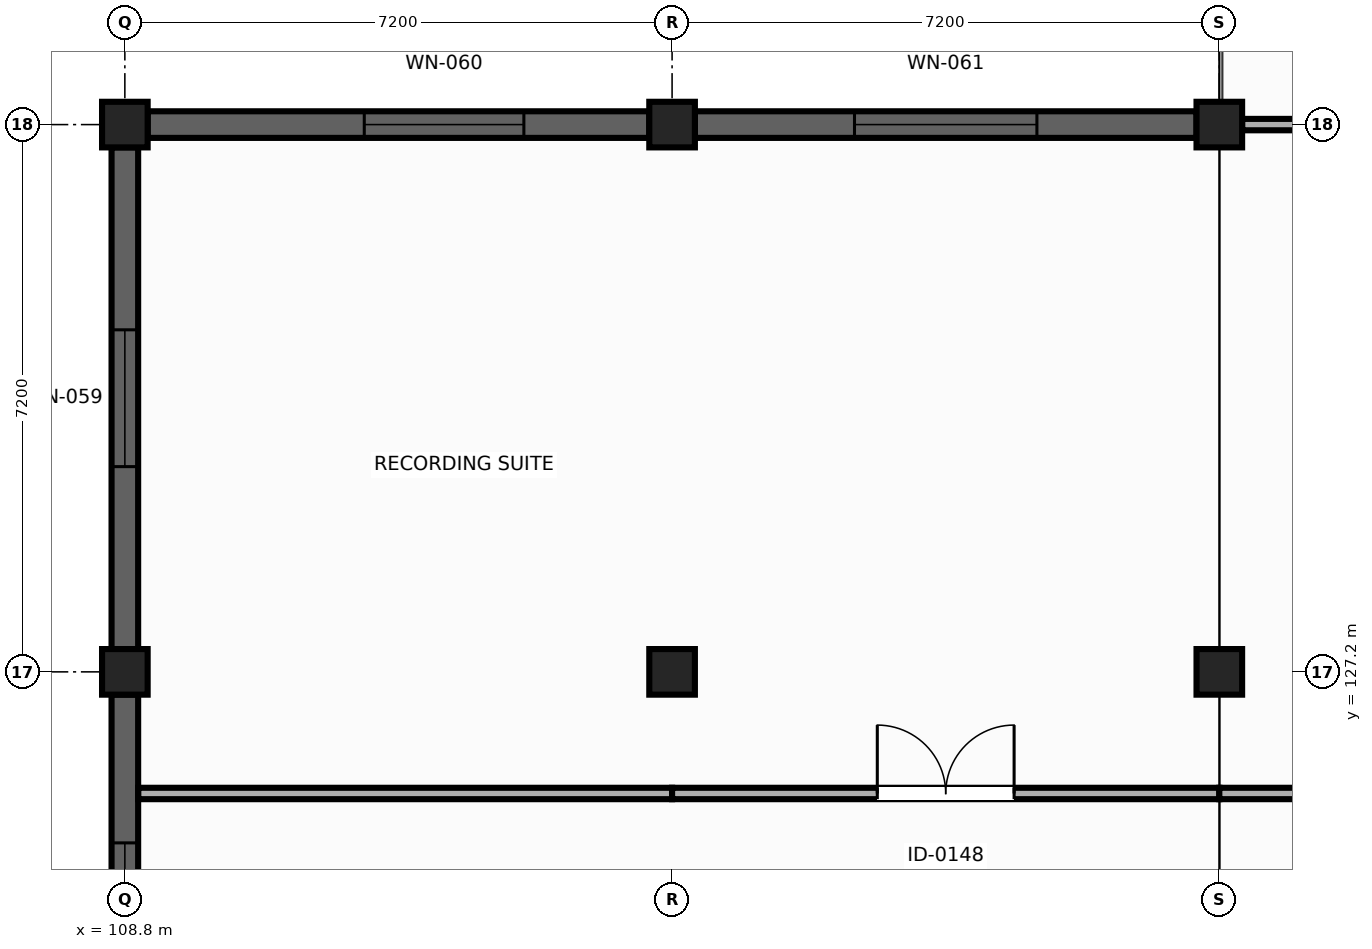
"""IFC4 building model, lengths in metres.
Left out: names, types, materials, properties, quantities, classifications, styles, units other than length and angle.
Written with IfcOpenShell. Run it as: python <this file> out.ifc"""

import sys

from ifc_helpers import new_model, si_unit, direction, frame, frame_2d, origin, origin_2d, place, context, subcontext, project, spatial, rectangle, extrude, element, fill, save


model = new_model("IFC4")
c1 = context("Model", 3, precision=1e-05, world=origin(), true_north=direction((0.0, 1.0)))
c2 = subcontext(c1, "Body", "Model", "MODEL_VIEW")
j1 = project(units=[si_unit("LENGTHUNIT", "METRE"), si_unit("PLANEANGLEUNIT", "RADIAN")], contexts=[c1])
p1 = place(None, origin())
s1 = spatial("IfcSite", under=j1, at=p1, CompositionType="ELEMENT")
p2 = place(p1, origin())
s2 = spatial("IfcBuilding", under=s1, at=p2, CompositionType="ELEMENT")
p3 = place(p2, frame((0.0, 0.0, 14.4)))
s3 = spatial("IfcBuildingStorey", under=s2, at=p3, CompositionType="ELEMENT", Elevation=14.4)
for number, where, z_axis, x_axis in (
    (1, (108.8, 127.2, 0.0), (0.0, 0.0, 1.0), (1.0, 0.0, 0.0)),
    (2, (116.0, 127.2, 0.0), (0.0, 0.0, 1.0), (0.0, 1.0, 0.0)),
    (3, (123.2, 127.2, 0.0), (0.0, 0.0, 1.0), (1.0, 0.0, 0.0)),
    (4, (108.8, 134.4, 0.0), (0.0, 0.0, 1.0), (0.0, 1.0, 0.0)),
    (5, (116.0, 134.4, 0.0), (0.0, 0.0, 1.0), (1.0, 0.0, 0.0)),
    (6, (123.2, 134.4, 0.0), (0.0, 0.0, 1.0), (0.0, 1.0, 0.0)),
):
    element("IfcColumn", number, at=place(p3, frame(where, z_axis=z_axis, x_axis=x_axis)), inside=s3, PredefinedType="COLUMN", context=c2, shape_type="SweptSolid", body=[
        extrude(rectangle(XDim=0.6, YDim=0.6, at=origin_2d()), origin(), (0.0, 0.0, 1.0), 4.5),
    ])
p4 = place(p3, frame((108.8, 120.3, 0.0), z_axis=(0.0, 0.0, 1.0), x_axis=(0.0, 1.0, 0.0)))
e7 = element("IfcWall", 7, at=p4, inside=s3, PredefinedType="SOLIDWALL", context=c2, shape_type="SweptSolid", body=[
    extrude(rectangle(XDim=6.6, YDim=0.35, at=frame_2d((3.3, 0.0))), origin(), (0.0, 0.0, 1.0), 4.22),
])
p5 = place(p4, frame((3.15, 0.0, 0.9)))
e8 = element("IfcOpeningElement", 8, at=p5, cuts=e7, PredefinedType="OPENING", context=c2, shape_type="SweptSolid", body=[
    extrude(rectangle(XDim=1.5, YDim=2.1, at=frame_2d((0.75, 1.05))), frame((0.0, 0.185, 0.0), z_axis=(0.0, -1.0, 0.0), x_axis=(1.0, 0.0, 0.0)), (0.0, 0.0, 1.0), 0.37),
])
p6 = place(p3, frame((108.8, 127.5, 0.0), z_axis=(0.0, 0.0, 1.0), x_axis=(0.0, 1.0, 0.0)))
e9 = element("IfcWall", 9, at=p6, inside=s3, PredefinedType="SOLIDWALL", context=c2, shape_type="SweptSolid", body=[
    extrude(rectangle(XDim=6.6, YDim=0.35, at=frame_2d((3.3, 0.0))), origin(), (0.0, 0.0, 1.0), 4.22),
])
p7 = place(p6, frame((2.4, 0.0, 0.9)))
e10 = element("IfcOpeningElement", 10, at=p7, cuts=e9, PredefinedType="OPENING", context=c2, shape_type="SweptSolid", body=[
    extrude(rectangle(XDim=1.8, YDim=2.1, at=frame_2d((0.9, 1.05))), frame((0.0, 0.185, 0.0), z_axis=(0.0, -1.0, 0.0), x_axis=(1.0, 0.0, 0.0)), (0.0, 0.0, 1.0), 0.37),
])
p8 = place(p3, frame((109.1, 134.4, 0.0), z_axis=(0.0, 0.0, 1.0), x_axis=(1.0, 0.0, 0.0)))
e11 = element("IfcWall", 11, at=p8, inside=s3, PredefinedType="SOLIDWALL", context=c2, shape_type="SweptSolid", body=[
    extrude(rectangle(XDim=6.6, YDim=0.35, at=frame_2d((3.3, 0.0))), origin(), (0.0, 0.0, 1.0), 4.22),
])
p9 = place(p8, frame((2.85, 0.0, 0.9)))
e12 = element("IfcOpeningElement", 12, at=p9, cuts=e11, PredefinedType="OPENING", context=c2, shape_type="SweptSolid", body=[
    extrude(rectangle(XDim=2.1, YDim=2.1, at=frame_2d((1.05, 1.05))), frame((0.0, 0.185, 0.0), z_axis=(0.0, -1.0, 0.0), x_axis=(1.0, 0.0, 0.0)), (0.0, 0.0, 1.0), 0.37),
])
p10 = place(p3, frame((116.3, 134.4, 0.0), z_axis=(0.0, 0.0, 1.0), x_axis=(1.0, 0.0, 0.0)))
e13 = element("IfcWall", 13, at=p10, inside=s3, PredefinedType="SOLIDWALL", context=c2, shape_type="SweptSolid", body=[
    extrude(rectangle(XDim=6.6, YDim=0.35, at=frame_2d((3.3, 0.0))), origin(), (0.0, 0.0, 1.0), 4.22),
])
p11 = place(p10, frame((2.1, 0.0, 0.9)))
e14 = element("IfcOpeningElement", 14, at=p11, cuts=e13, PredefinedType="OPENING", context=c2, shape_type="SweptSolid", body=[
    extrude(rectangle(XDim=2.4, YDim=2.1, at=frame_2d((1.2, 1.05))), frame((0.0, 0.185, 0.0), z_axis=(0.0, -1.0, 0.0), x_axis=(1.0, 0.0, 0.0)), (0.0, 0.0, 1.0), 0.37),
])
p12 = place(p3, frame((130.1, 134.4, 0.0), z_axis=(0.0, 0.0, 1.0), x_axis=(-1.0, 0.0, 0.0)))
e15 = element("IfcWall", 15, at=p12, inside=s3, PredefinedType="PARTITIONING", context=c2, shape_type="SweptSolid", body=[
    extrude(rectangle(XDim=6.6, YDim=0.15, at=frame_2d((3.3, 0.0))), origin(), (0.0, 0.0, 1.0), 3.715),
])
p13 = place(p3, frame((108.977, 125.6, 0.0), z_axis=(0.0, 0.0, 1.0), x_axis=(1.0, 0.0, 0.0)))
e16 = element("IfcWall", 16, at=p13, inside=s3, PredefinedType="PARTITIONING", context=c2, shape_type="SweptSolid", body=[
    extrude(rectangle(XDim=7.023, YDim=0.15, at=frame_2d((3.511, 0.0))), origin(), (0.0, 0.0, 1.0), 3.515),
])
p14 = place(p3, frame((116.0, 125.6, 0.0), z_axis=(0.0, 0.0, 1.0), x_axis=(1.0, 0.0, 0.0)))
e17 = element("IfcWall", 17, at=p14, inside=s3, PredefinedType="PARTITIONING", context=c2, shape_type="SweptSolid", body=[
    extrude(rectangle(XDim=7.2, YDim=0.15, at=frame_2d((3.6, 0.0))), origin(), (0.0, 0.0, 1.0), 3.515),
])
p15 = place(p14, frame((2.7, 0.0, 0.0)))
e18 = element("IfcOpeningElement", 18, at=p15, cuts=e17, PredefinedType="OPENING", context=c2, shape_type="SweptSolid", body=[
    extrude(rectangle(XDim=1.8, YDim=2.3, at=frame_2d((0.9, 1.15))), frame((0.0, 0.085, 0.0), z_axis=(0.0, -1.0, 0.0), x_axis=(1.0, 0.0, 0.0)), (0.0, 0.0, 1.0), 0.17),
])
p16 = place(p3, frame((123.2, 125.6, 0.0), z_axis=(0.0, 0.0, 1.0), x_axis=(1.0, 0.0, 0.0)))
e19 = element("IfcWall", 19, at=p16, inside=s3, PredefinedType="PARTITIONING", context=c2, shape_type="SweptSolid", body=[
    extrude(rectangle(XDim=7.123, YDim=0.15, at=frame_2d((3.562, 0.0))), origin(), (0.0, 0.0, 1.0), 3.515),
])
p17 = place(p5, origin())
e20 = element("IfcWindow", 20, at=p17, inside=s3, PartitioningType="SINGLE_PANEL", PredefinedType="WINDOW", context=c2, shape_type="SweptSolid", body=[
    extrude(rectangle(XDim=1.5, YDim=2.1, at=frame_2d((0.75, 1.05))), frame((0.0, 0.03, 0.0), z_axis=(0.0, -1.0, 0.0), x_axis=(1.0, 0.0, 0.0)), (0.0, 0.0, 1.0), 0.06),
])
fill(e8, e20)
p18 = place(p7, origin())
e21 = element("IfcWindow", 21, at=p18, inside=s3, PartitioningType="SINGLE_PANEL", PredefinedType="WINDOW", context=c2, shape_type="SweptSolid", body=[
    extrude(rectangle(XDim=1.8, YDim=2.1, at=frame_2d((0.9, 1.05))), frame((0.0, 0.03, 0.0), z_axis=(0.0, -1.0, 0.0), x_axis=(1.0, 0.0, 0.0)), (0.0, 0.0, 1.0), 0.06),
])
fill(e10, e21)
p19 = place(p9, origin())
e22 = element("IfcWindow", 22, at=p19, inside=s3, PartitioningType="SINGLE_PANEL", PredefinedType="WINDOW", context=c2, shape_type="SweptSolid", body=[
    extrude(rectangle(XDim=2.1, YDim=2.1, at=frame_2d((1.05, 1.05))), frame((0.0, 0.03, 0.0), z_axis=(0.0, -1.0, 0.0), x_axis=(1.0, 0.0, 0.0)), (0.0, 0.0, 1.0), 0.06),
])
fill(e12, e22)
p20 = place(p11, origin())
e23 = element("IfcWindow", 23, at=p20, inside=s3, PartitioningType="SINGLE_PANEL", PredefinedType="WINDOW", context=c2, shape_type="SweptSolid", body=[
    extrude(rectangle(XDim=2.4, YDim=2.1, at=frame_2d((1.2, 1.05))), frame((0.0, 0.03, 0.0), z_axis=(0.0, -1.0, 0.0), x_axis=(1.0, 0.0, 0.0)), (0.0, 0.0, 1.0), 0.06),
])
fill(e14, e23)
p21 = place(p15, origin())
e24 = element("IfcDoor", 24, at=p21, inside=s3, OperationType="DOUBLE_DOOR_SINGLE_SWING", PredefinedType="DOOR", context=c2, shape_type="SweptSolid", body=[
    extrude(rectangle(XDim=1.8, YDim=2.3, at=frame_2d((0.9, 1.15))), frame((0.0, 0.025, 0.0), z_axis=(0.0, -1.0, 0.0), x_axis=(1.0, 0.0, 0.0)), (0.0, 0.0, 1.0), 0.05),
])
fill(e18, e24)
save(model, sys.argv[1])
